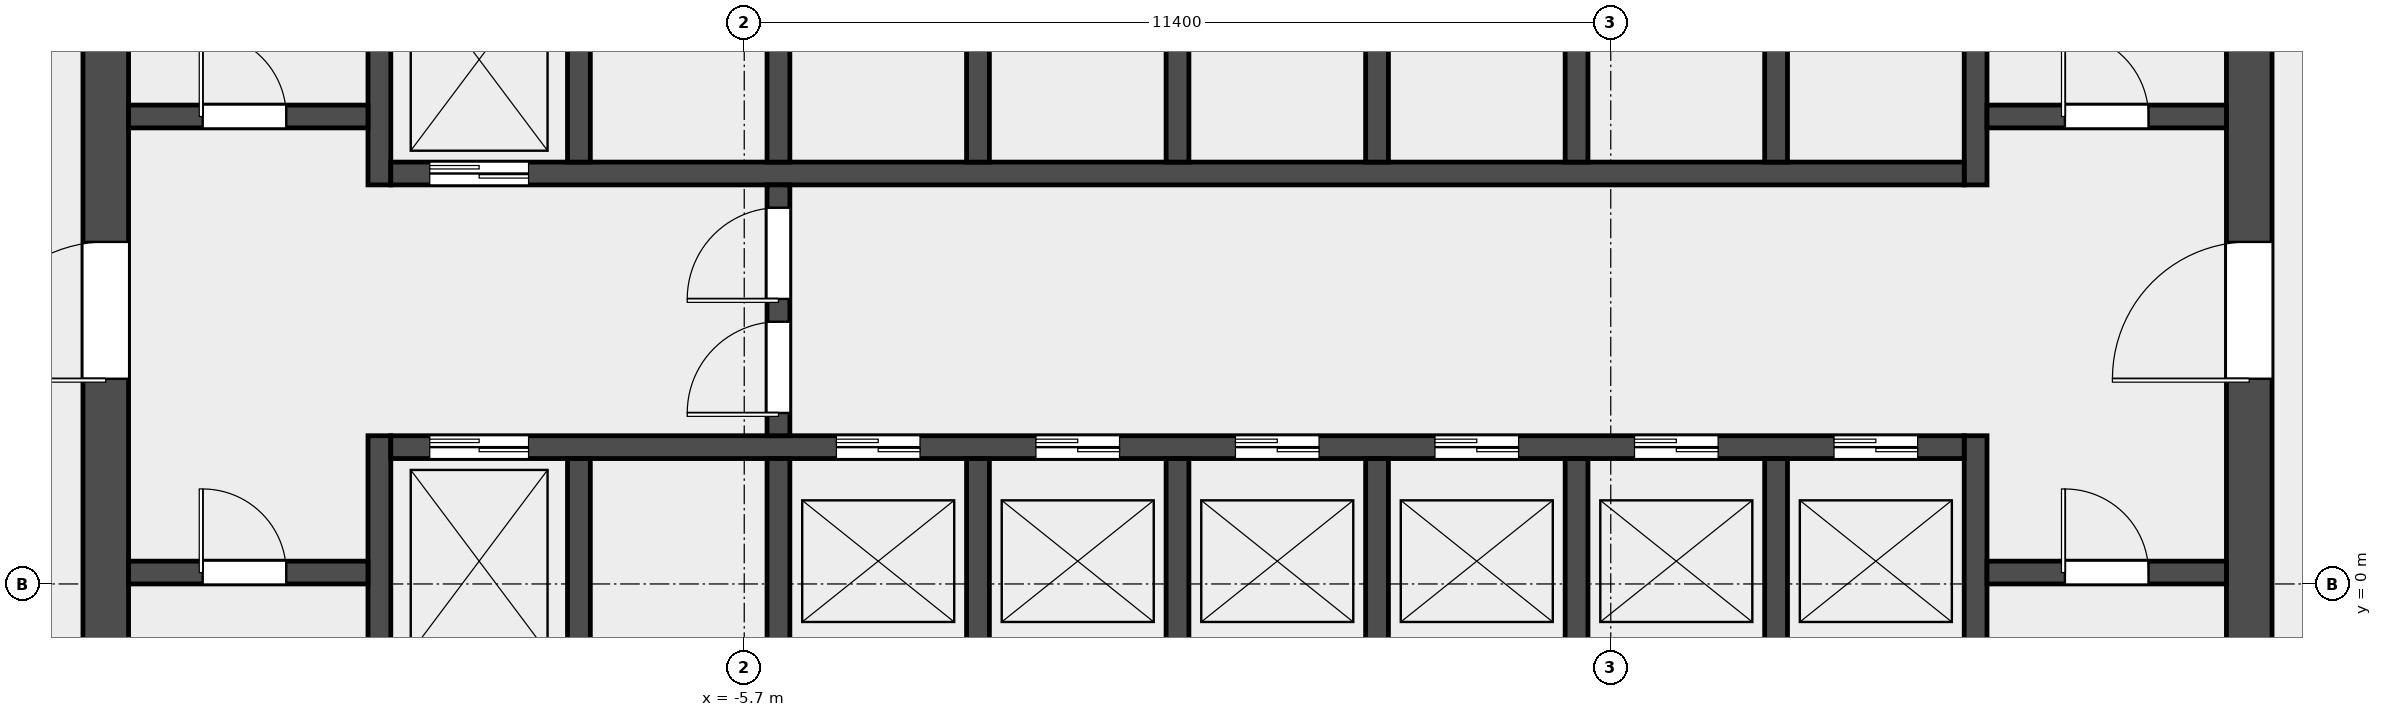
"""IFC4 building model, lengths in metres.
Left out: names, types, materials, properties, quantities, classifications, styles, units other than length and angle.
Written with IfcOpenShell. Run it as: python <this file> out.ifc"""

import sys

from ifc_helpers import new_model, si_unit, direction, frame, frame_2d, origin, place, context, subcontext, project, spatial, rectangle, extrude, element, fill, save


model = new_model("IFC4")
c1 = context("Model", 3, precision=1e-05, world=origin(), true_north=direction((0.0, 1.0)))
c2 = subcontext(c1, "Body", "Model", "MODEL_VIEW")
j1 = project(units=[si_unit("LENGTHUNIT", "METRE"), si_unit("PLANEANGLEUNIT", "RADIAN")], contexts=[c1])
p1 = place(None, origin())
s1 = spatial("IfcSite", under=j1, at=p1, CompositionType="ELEMENT")
p2 = place(p1, origin())
s2 = spatial("IfcBuilding", under=s1, at=p2, CompositionType="ELEMENT")
p3 = place(p2, frame((0.0, 0.0, 144.1)))
s3 = spatial("IfcBuildingStorey", under=s2, at=p3, CompositionType="ELEMENT", Elevation=144.1)
p4 = place(p3, frame((-14.1, -6.6, 0.0), z_axis=(0.0, 0.0, 1.0), x_axis=(0.0, 1.0, 0.0)))
e1 = element("IfcWall", 1, at=p4, inside=s3, PredefinedType="SHEAR", context=c2, shape_type="SweptSolid", body=[
    extrude(rectangle(XDim=19.5, YDim=0.6, at=frame_2d((9.75, 0.0))), origin(), (0.0, 0.0, 1.0), 4.2),
])
p5 = place(p4, frame((9.3, 0.0, 0.0)))
e2 = element("IfcOpeningElement", 2, at=p5, cuts=e1, PredefinedType="OPENING", context=c2, shape_type="SweptSolid", body=[
    extrude(rectangle(XDim=1.8, YDim=2.1, at=frame_2d((0.9, 1.05))), frame((0.0, 0.312, 0.0), z_axis=(0.0, -1.0, 0.0), x_axis=(1.0, 0.0, 0.0)), (0.0, 0.0, 1.0), 0.624),
])
p6 = place(p3, frame((14.1, -6.6, 0.0), z_axis=(0.0, 0.0, 1.0), x_axis=(0.0, 1.0, 0.0)))
e3 = element("IfcWall", 3, at=p6, inside=s3, PredefinedType="SHEAR", context=c2, shape_type="SweptSolid", body=[
    extrude(rectangle(XDim=19.5, YDim=0.6, at=frame_2d((9.75, 0.0))), origin(), (0.0, 0.0, 1.0), 4.2),
])
p7 = place(p6, frame((9.3, 0.0, 0.0)))
e4 = element("IfcOpeningElement", 4, at=p7, cuts=e3, PredefinedType="OPENING", context=c2, shape_type="SweptSolid", body=[
    extrude(rectangle(XDim=1.8, YDim=2.1, at=frame_2d((0.9, 1.05))), frame((0.0, 0.312, 0.0), z_axis=(0.0, -1.0, 0.0), x_axis=(1.0, 0.0, 0.0)), (0.0, 0.0, 1.0), 0.624),
])
p8 = place(p3, frame((-10.5, -6.6, 0.0), z_axis=(0.0, 0.0, 1.0), x_axis=(0.0, 1.0, 0.0)))
e5 = element("IfcWall", 5, at=p8, inside=s3, PredefinedType="SHEAR", context=c2, shape_type="SweptSolid", body=[
    extrude(rectangle(XDim=8.55, YDim=0.3, at=frame_2d((4.275, 0.0))), origin(), (0.0, 0.0, 1.0), 4.2),
])
p9 = place(p3, frame((-10.5, 5.25, 0.0), z_axis=(0.0, 0.0, 1.0), x_axis=(0.0, 1.0, 0.0)))
e6 = element("IfcWall", 6, at=p9, inside=s3, PredefinedType="SHEAR", context=c2, shape_type="SweptSolid", body=[
    extrude(rectangle(XDim=7.65, YDim=0.3, at=frame_2d((3.825, 0.0))), origin(), (0.0, 0.0, 1.0), 4.2),
])
p10 = place(p3, frame((10.5, -6.6, 0.0), z_axis=(0.0, 0.0, 1.0), x_axis=(0.0, 1.0, 0.0)))
e7 = element("IfcWall", 7, at=p10, inside=s3, PredefinedType="SHEAR", context=c2, shape_type="SweptSolid", body=[
    extrude(rectangle(XDim=8.55, YDim=0.3, at=frame_2d((4.275, 0.0))), origin(), (0.0, 0.0, 1.0), 4.2),
])
p11 = place(p3, frame((10.5, 5.25, 0.0), z_axis=(0.0, 0.0, 1.0), x_axis=(0.0, 1.0, 0.0)))
e8 = element("IfcWall", 8, at=p11, inside=s3, PredefinedType="SHEAR", context=c2, shape_type="SweptSolid", body=[
    extrude(rectangle(XDim=7.65, YDim=0.3, at=frame_2d((3.825, 0.0))), origin(), (0.0, 0.0, 1.0), 4.2),
])
p12 = place(p3, frame((-13.8, 0.15, 0.0), z_axis=(0.0, 0.0, 1.0), x_axis=(1.0, 0.0, 0.0)))
e9 = element("IfcWall", 9, at=p12, inside=s3, PredefinedType="SOLIDWALL", context=c2, shape_type="SweptSolid", body=[
    extrude(rectangle(XDim=3.15, YDim=0.3, at=frame_2d((1.575, 0.0))), origin(), (0.0, 0.0, 1.0), 4.2),
])
p13 = place(p12, frame((0.975, 0.0, 0.0)))
e10 = element("IfcOpeningElement", 10, at=p13, cuts=e9, PredefinedType="OPENING", context=c2, shape_type="SweptSolid", body=[
    extrude(rectangle(XDim=1.1, YDim=2.1, at=frame_2d((0.55, 1.05))), frame((0.0, 0.162, 0.0), z_axis=(0.0, -1.0, 0.0), x_axis=(1.0, 0.0, 0.0)), (0.0, 0.0, 1.0), 0.324),
])
p14 = place(p3, frame((-13.8, 6.15, 0.0), z_axis=(0.0, 0.0, 1.0), x_axis=(1.0, 0.0, 0.0)))
e11 = element("IfcWall", 11, at=p14, inside=s3, PredefinedType="SOLIDWALL", context=c2, shape_type="SweptSolid", body=[
    extrude(rectangle(XDim=3.15, YDim=0.3, at=frame_2d((1.575, 0.0))), origin(), (0.0, 0.0, 1.0), 4.2),
])
p15 = place(p14, frame((0.975, 0.0, 0.0)))
e12 = element("IfcOpeningElement", 12, at=p15, cuts=e11, PredefinedType="OPENING", context=c2, shape_type="SweptSolid", body=[
    extrude(rectangle(XDim=1.1, YDim=2.1, at=frame_2d((0.55, 1.05))), frame((0.0, 0.162, 0.0), z_axis=(0.0, -1.0, 0.0), x_axis=(1.0, 0.0, 0.0)), (0.0, 0.0, 1.0), 0.324),
])
p16 = place(p3, frame((10.65, 0.15, 0.0), z_axis=(0.0, 0.0, 1.0), x_axis=(1.0, 0.0, 0.0)))
e13 = element("IfcWall", 13, at=p16, inside=s3, PredefinedType="SOLIDWALL", context=c2, shape_type="SweptSolid", body=[
    extrude(rectangle(XDim=3.15, YDim=0.3, at=frame_2d((1.575, 0.0))), origin(), (0.0, 0.0, 1.0), 4.2),
])
p17 = place(p16, frame((1.025, 0.0, 0.0)))
e14 = element("IfcOpeningElement", 14, at=p17, cuts=e13, PredefinedType="OPENING", context=c2, shape_type="SweptSolid", body=[
    extrude(rectangle(XDim=1.1, YDim=2.1, at=frame_2d((0.55, 1.05))), frame((0.0, 0.162, 0.0), z_axis=(0.0, -1.0, 0.0), x_axis=(1.0, 0.0, 0.0)), (0.0, 0.0, 1.0), 0.324),
])
p18 = place(p3, frame((10.65, 6.15, 0.0), z_axis=(0.0, 0.0, 1.0), x_axis=(1.0, 0.0, 0.0)))
e15 = element("IfcWall", 15, at=p18, inside=s3, PredefinedType="SOLIDWALL", context=c2, shape_type="SweptSolid", body=[
    extrude(rectangle(XDim=3.15, YDim=0.3, at=frame_2d((1.575, 0.0))), origin(), (0.0, 0.0, 1.0), 4.2),
])
p19 = place(p18, frame((1.025, 0.0, 0.0)))
e16 = element("IfcOpeningElement", 16, at=p19, cuts=e15, PredefinedType="OPENING", context=c2, shape_type="SweptSolid", body=[
    extrude(rectangle(XDim=1.1, YDim=2.1, at=frame_2d((0.55, 1.05))), frame((0.0, 0.162, 0.0), z_axis=(0.0, -1.0, 0.0), x_axis=(1.0, 0.0, 0.0)), (0.0, 0.0, 1.0), 0.324),
])
p20 = place(p3, frame((-10.35, 1.8, 0.0), z_axis=(0.0, 0.0, 1.0), x_axis=(1.0, 0.0, 0.0)))
e17 = element("IfcWall", 17, at=p20, inside=s3, PredefinedType="SOLIDWALL", context=c2, shape_type="SweptSolid", body=[
    extrude(rectangle(XDim=20.7, YDim=0.3, at=frame_2d((10.35, 0.0))), origin(), (0.0, 0.0, 1.0), 4.2),
])
p21 = place(p20, frame((0.512, 0.0, 0.0)))
e18 = element("IfcOpeningElement", 18, at=p21, cuts=e17, PredefinedType="OPENING", context=c2, shape_type="SweptSolid", body=[
    extrude(rectangle(XDim=1.3, YDim=2.1, at=frame_2d((0.65, 1.05))), frame((0.0, 0.162, 0.0), z_axis=(0.0, -1.0, 0.0), x_axis=(1.0, 0.0, 0.0)), (0.0, 0.0, 1.0), 0.324),
])
p22 = place(p20, frame((5.863, 0.0, 0.0)))
e19 = element("IfcOpeningElement", 19, at=p22, cuts=e17, PredefinedType="OPENING", context=c2, shape_type="SweptSolid", body=[
    extrude(rectangle(XDim=1.1, YDim=2.1, at=frame_2d((0.55, 1.05))), frame((0.0, 0.162, 0.0), z_axis=(0.0, -1.0, 0.0), x_axis=(1.0, 0.0, 0.0)), (0.0, 0.0, 1.0), 0.324),
])
p23 = place(p20, frame((8.488, 0.0, 0.0)))
e20 = element("IfcOpeningElement", 20, at=p23, cuts=e17, PredefinedType="OPENING", context=c2, shape_type="SweptSolid", body=[
    extrude(rectangle(XDim=1.1, YDim=2.1, at=frame_2d((0.55, 1.05))), frame((0.0, 0.162, 0.0), z_axis=(0.0, -1.0, 0.0), x_axis=(1.0, 0.0, 0.0)), (0.0, 0.0, 1.0), 0.324),
])
p24 = place(p20, frame((11.113, 0.0, 0.0)))
e21 = element("IfcOpeningElement", 21, at=p24, cuts=e17, PredefinedType="OPENING", context=c2, shape_type="SweptSolid", body=[
    extrude(rectangle(XDim=1.1, YDim=2.1, at=frame_2d((0.55, 1.05))), frame((0.0, 0.162, 0.0), z_axis=(0.0, -1.0, 0.0), x_axis=(1.0, 0.0, 0.0)), (0.0, 0.0, 1.0), 0.324),
])
p25 = place(p20, frame((13.738, 0.0, 0.0)))
e22 = element("IfcOpeningElement", 22, at=p25, cuts=e17, PredefinedType="OPENING", context=c2, shape_type="SweptSolid", body=[
    extrude(rectangle(XDim=1.1, YDim=2.1, at=frame_2d((0.55, 1.05))), frame((0.0, 0.162, 0.0), z_axis=(0.0, -1.0, 0.0), x_axis=(1.0, 0.0, 0.0)), (0.0, 0.0, 1.0), 0.324),
])
p26 = place(p20, frame((16.363, 0.0, 0.0)))
e23 = element("IfcOpeningElement", 23, at=p26, cuts=e17, PredefinedType="OPENING", context=c2, shape_type="SweptSolid", body=[
    extrude(rectangle(XDim=1.1, YDim=2.1, at=frame_2d((0.55, 1.05))), frame((0.0, 0.162, 0.0), z_axis=(0.0, -1.0, 0.0), x_axis=(1.0, 0.0, 0.0)), (0.0, 0.0, 1.0), 0.324),
])
p27 = place(p20, frame((18.988, 0.0, 0.0)))
e24 = element("IfcOpeningElement", 24, at=p27, cuts=e17, PredefinedType="OPENING", context=c2, shape_type="SweptSolid", body=[
    extrude(rectangle(XDim=1.1, YDim=2.1, at=frame_2d((0.55, 1.05))), frame((0.0, 0.162, 0.0), z_axis=(0.0, -1.0, 0.0), x_axis=(1.0, 0.0, 0.0)), (0.0, 0.0, 1.0), 0.324),
])
p28 = place(p3, frame((-10.35, 5.4, 0.0), z_axis=(0.0, 0.0, 1.0), x_axis=(1.0, 0.0, 0.0)))
e25 = element("IfcWall", 25, at=p28, inside=s3, PredefinedType="SOLIDWALL", context=c2, shape_type="SweptSolid", body=[
    extrude(rectangle(XDim=20.7, YDim=0.3, at=frame_2d((10.35, 0.0))), origin(), (0.0, 0.0, 1.0), 4.2),
])
p29 = place(p28, frame((0.512, 0.0, 0.0)))
e26 = element("IfcOpeningElement", 26, at=p29, cuts=e25, PredefinedType="OPENING", context=c2, shape_type="SweptSolid", body=[
    extrude(rectangle(XDim=1.3, YDim=2.1, at=frame_2d((0.65, 1.05))), frame((0.0, 0.162, 0.0), z_axis=(0.0, -1.0, 0.0), x_axis=(1.0, 0.0, 0.0)), (0.0, 0.0, 1.0), 0.324),
])
for number, where, z_axis, x_axis in (
    (27, (-7.875, -1.05, 0.0), (0.0, 0.0, 1.0), (0.0, 1.0, 0.0)),
    (28, (-5.25, -1.05, 0.0), (0.0, 0.0, 1.0), (0.0, 1.0, 0.0)),
    (29, (-2.625, -1.05, 0.0), (0.0, 0.0, 1.0), (0.0, 1.0, 0.0)),
    (30, (0.0, -1.05, 0.0), (0.0, 0.0, 1.0), (0.0, 1.0, 0.0)),
    (31, (2.625, -1.05, 0.0), (0.0, 0.0, 1.0), (0.0, 1.0, 0.0)),
    (32, (5.25, -1.05, 0.0), (0.0, 0.0, 1.0), (0.0, 1.0, 0.0)),
    (33, (7.875, -1.05, 0.0), (0.0, 0.0, 1.0), (0.0, 1.0, 0.0)),
    (34, (-7.875, 5.55, 0.0), (0.0, 0.0, 1.0), (0.0, 1.0, 0.0)),
    (35, (-5.25, 5.55, 0.0), (0.0, 0.0, 1.0), (0.0, 1.0, 0.0)),
    (36, (-2.625, 5.55, 0.0), (0.0, 0.0, 1.0), (0.0, 1.0, 0.0)),
    (37, (0.0, 5.55, 0.0), (0.0, 0.0, 1.0), (0.0, 1.0, 0.0)),
    (38, (2.625, 5.55, 0.0), (0.0, 0.0, 1.0), (0.0, 1.0, 0.0)),
    (39, (5.25, 5.55, 0.0), (0.0, 0.0, 1.0), (0.0, 1.0, 0.0)),
    (40, (7.875, 5.55, 0.0), (0.0, 0.0, 1.0), (0.0, 1.0, 0.0)),
):
    element("IfcWall", number, at=place(p3, frame(where, z_axis=z_axis, x_axis=x_axis)), inside=s3, PredefinedType="SOLIDWALL", context=c2, shape_type="SweptSolid", body=[
        extrude(rectangle(XDim=2.7, YDim=0.3, at=frame_2d((1.35, 0.0))), origin(), (0.0, 0.0, 1.0), 4.2),
    ])
p30 = place(p3, frame((-5.25, 1.95, 0.0), z_axis=(0.0, 0.0, 1.0), x_axis=(0.0, 1.0, 0.0)))
e41 = element("IfcWall", 41, at=p30, inside=s3, PredefinedType="SOLIDWALL", context=c2, shape_type="SweptSolid", body=[
    extrude(rectangle(XDim=3.3, YDim=0.3, at=frame_2d((1.65, 0.0))), origin(), (0.0, 0.0, 1.0), 4.2),
])
p31 = place(p30, frame((0.3, 0.0, 0.0)))
e42 = element("IfcOpeningElement", 42, at=p31, cuts=e41, PredefinedType="OPENING", context=c2, shape_type="SweptSolid", body=[
    extrude(rectangle(XDim=1.2, YDim=2.1, at=frame_2d((0.6, 1.05))), frame((0.0, 0.162, 0.0), z_axis=(0.0, -1.0, 0.0), x_axis=(1.0, 0.0, 0.0)), (0.0, 0.0, 1.0), 0.324),
])
p32 = place(p30, frame((1.8, 0.0, 0.0)))
e43 = element("IfcOpeningElement", 43, at=p32, cuts=e41, PredefinedType="OPENING", context=c2, shape_type="SweptSolid", body=[
    extrude(rectangle(XDim=1.2, YDim=2.1, at=frame_2d((0.6, 1.05))), frame((0.0, 0.162, 0.0), z_axis=(0.0, -1.0, 0.0), x_axis=(1.0, 0.0, 0.0)), (0.0, 0.0, 1.0), 0.324),
])
p33 = place(p13, origin())
e44 = element("IfcDoor", 44, at=p33, inside=s3, OperationType="SINGLE_SWING_LEFT", PredefinedType="DOOR", context=c2, shape_type="SweptSolid", body=[
    extrude(rectangle(XDim=1.1, YDim=2.1, at=frame_2d((0.55, 1.05))), frame((0.0, 0.025, 0.0), z_axis=(0.0, -1.0, 0.0), x_axis=(1.0, 0.0, 0.0)), (0.0, 0.0, 1.0), 0.05),
])
fill(e10, e44)
p34 = place(p15, origin())
e45 = element("IfcDoor", 45, at=p34, inside=s3, OperationType="SINGLE_SWING_LEFT", PredefinedType="DOOR", context=c2, shape_type="SweptSolid", body=[
    extrude(rectangle(XDim=1.1, YDim=2.1, at=frame_2d((0.55, 1.05))), frame((0.0, 0.025, 0.0), z_axis=(0.0, -1.0, 0.0), x_axis=(1.0, 0.0, 0.0)), (0.0, 0.0, 1.0), 0.05),
])
fill(e12, e45)
p35 = place(p17, origin())
e46 = element("IfcDoor", 46, at=p35, inside=s3, OperationType="SINGLE_SWING_RIGHT", PredefinedType="DOOR", context=c2, shape_type="SweptSolid", body=[
    extrude(rectangle(XDim=1.1, YDim=2.1, at=frame_2d((0.55, 1.05))), frame((0.0, 0.025, 0.0), z_axis=(0.0, -1.0, 0.0), x_axis=(1.0, 0.0, 0.0)), (0.0, 0.0, 1.0), 0.05),
])
fill(e14, e46)
p36 = place(p19, origin())
e47 = element("IfcDoor", 47, at=p36, inside=s3, OperationType="SINGLE_SWING_RIGHT", PredefinedType="DOOR", context=c2, shape_type="SweptSolid", body=[
    extrude(rectangle(XDim=1.1, YDim=2.1, at=frame_2d((0.55, 1.05))), frame((0.0, 0.025, 0.0), z_axis=(0.0, -1.0, 0.0), x_axis=(1.0, 0.0, 0.0)), (0.0, 0.0, 1.0), 0.05),
])
fill(e16, e47)
p37 = place(p5, origin())
e48 = element("IfcDoor", 48, at=p37, inside=s3, OperationType="DOUBLE_DOOR_SINGLE_SWING", PredefinedType="DOOR", context=c2, shape_type="SweptSolid", body=[
    extrude(rectangle(XDim=1.8, YDim=2.1, at=frame_2d((0.9, 1.05))), frame((0.0, 0.025, 0.0), z_axis=(0.0, -1.0, 0.0), x_axis=(1.0, 0.0, 0.0)), (0.0, 0.0, 1.0), 0.05),
])
fill(e2, e48)
p38 = place(p7, origin())
e49 = element("IfcDoor", 49, at=p38, inside=s3, OperationType="DOUBLE_DOOR_SINGLE_SWING", PredefinedType="DOOR", context=c2, shape_type="SweptSolid", body=[
    extrude(rectangle(XDim=1.8, YDim=2.1, at=frame_2d((0.9, 1.05))), frame((0.0, 0.025, 0.0), z_axis=(0.0, -1.0, 0.0), x_axis=(1.0, 0.0, 0.0)), (0.0, 0.0, 1.0), 0.05),
])
fill(e4, e49)
p39 = place(p31, origin())
e50 = element("IfcDoor", 50, at=p39, inside=s3, OperationType="SINGLE_SWING_LEFT", PredefinedType="DOOR", context=c2, shape_type="SweptSolid", body=[
    extrude(rectangle(XDim=1.2, YDim=2.1, at=frame_2d((0.6, 1.05))), frame((0.0, 0.025, 0.0), z_axis=(0.0, -1.0, 0.0), x_axis=(1.0, 0.0, 0.0)), (0.0, 0.0, 1.0), 0.05),
])
fill(e42, e50)
p40 = place(p32, origin())
e51 = element("IfcDoor", 51, at=p40, inside=s3, OperationType="SINGLE_SWING_RIGHT", PredefinedType="DOOR", context=c2, shape_type="SweptSolid", body=[
    extrude(rectangle(XDim=1.2, YDim=2.1, at=frame_2d((0.6, 1.05))), frame((0.0, 0.025, 0.0), z_axis=(0.0, -1.0, 0.0), x_axis=(1.0, 0.0, 0.0)), (0.0, 0.0, 1.0), 0.05),
])
fill(e43, e51)
p41 = place(p21, origin())
e52 = element("IfcDoor", 52, at=p41, inside=s3, OperationType="DOUBLE_DOOR_SLIDING", PredefinedType="DOOR", context=c2, shape_type="SweptSolid", body=[
    extrude(rectangle(XDim=1.3, YDim=2.1, at=frame_2d((0.65, 1.05))), frame((0.0, 0.025, 0.0), z_axis=(0.0, -1.0, 0.0), x_axis=(1.0, 0.0, 0.0)), (0.0, 0.0, 1.0), 0.05),
])
fill(e18, e52)
p42 = place(p22, origin())
e53 = element("IfcDoor", 53, at=p42, inside=s3, OperationType="DOUBLE_DOOR_SLIDING", PredefinedType="DOOR", context=c2, shape_type="SweptSolid", body=[
    extrude(rectangle(XDim=1.1, YDim=2.1, at=frame_2d((0.55, 1.05))), frame((0.0, 0.025, 0.0), z_axis=(0.0, -1.0, 0.0), x_axis=(1.0, 0.0, 0.0)), (0.0, 0.0, 1.0), 0.05),
])
fill(e19, e53)
p43 = place(p23, origin())
e54 = element("IfcDoor", 54, at=p43, inside=s3, OperationType="DOUBLE_DOOR_SLIDING", PredefinedType="DOOR", context=c2, shape_type="SweptSolid", body=[
    extrude(rectangle(XDim=1.1, YDim=2.1, at=frame_2d((0.55, 1.05))), frame((0.0, 0.025, 0.0), z_axis=(0.0, -1.0, 0.0), x_axis=(1.0, 0.0, 0.0)), (0.0, 0.0, 1.0), 0.05),
])
fill(e20, e54)
p44 = place(p24, origin())
e55 = element("IfcDoor", 55, at=p44, inside=s3, OperationType="DOUBLE_DOOR_SLIDING", PredefinedType="DOOR", context=c2, shape_type="SweptSolid", body=[
    extrude(rectangle(XDim=1.1, YDim=2.1, at=frame_2d((0.55, 1.05))), frame((0.0, 0.025, 0.0), z_axis=(0.0, -1.0, 0.0), x_axis=(1.0, 0.0, 0.0)), (0.0, 0.0, 1.0), 0.05),
])
fill(e21, e55)
p45 = place(p25, origin())
e56 = element("IfcDoor", 56, at=p45, inside=s3, OperationType="DOUBLE_DOOR_SLIDING", PredefinedType="DOOR", context=c2, shape_type="SweptSolid", body=[
    extrude(rectangle(XDim=1.1, YDim=2.1, at=frame_2d((0.55, 1.05))), frame((0.0, 0.025, 0.0), z_axis=(0.0, -1.0, 0.0), x_axis=(1.0, 0.0, 0.0)), (0.0, 0.0, 1.0), 0.05),
])
fill(e22, e56)
p46 = place(p26, origin())
e57 = element("IfcDoor", 57, at=p46, inside=s3, OperationType="DOUBLE_DOOR_SLIDING", PredefinedType="DOOR", context=c2, shape_type="SweptSolid", body=[
    extrude(rectangle(XDim=1.1, YDim=2.1, at=frame_2d((0.55, 1.05))), frame((0.0, 0.025, 0.0), z_axis=(0.0, -1.0, 0.0), x_axis=(1.0, 0.0, 0.0)), (0.0, 0.0, 1.0), 0.05),
])
fill(e23, e57)
p47 = place(p27, origin())
e58 = element("IfcDoor", 58, at=p47, inside=s3, OperationType="DOUBLE_DOOR_SLIDING", PredefinedType="DOOR", context=c2, shape_type="SweptSolid", body=[
    extrude(rectangle(XDim=1.1, YDim=2.1, at=frame_2d((0.55, 1.05))), frame((0.0, 0.025, 0.0), z_axis=(0.0, -1.0, 0.0), x_axis=(1.0, 0.0, 0.0)), (0.0, 0.0, 1.0), 0.05),
])
fill(e24, e58)
p48 = place(p29, origin())
e59 = element("IfcDoor", 59, at=p48, inside=s3, OperationType="DOUBLE_DOOR_SLIDING", PredefinedType="DOOR", context=c2, shape_type="SweptSolid", body=[
    extrude(rectangle(XDim=1.3, YDim=2.1, at=frame_2d((0.65, 1.05))), frame((0.0, 0.025, 0.0), z_axis=(0.0, -1.0, 0.0), x_axis=(1.0, 0.0, 0.0)), (0.0, 0.0, 1.0), 0.05),
])
fill(e26, e59)
save(model, sys.argv[1])
